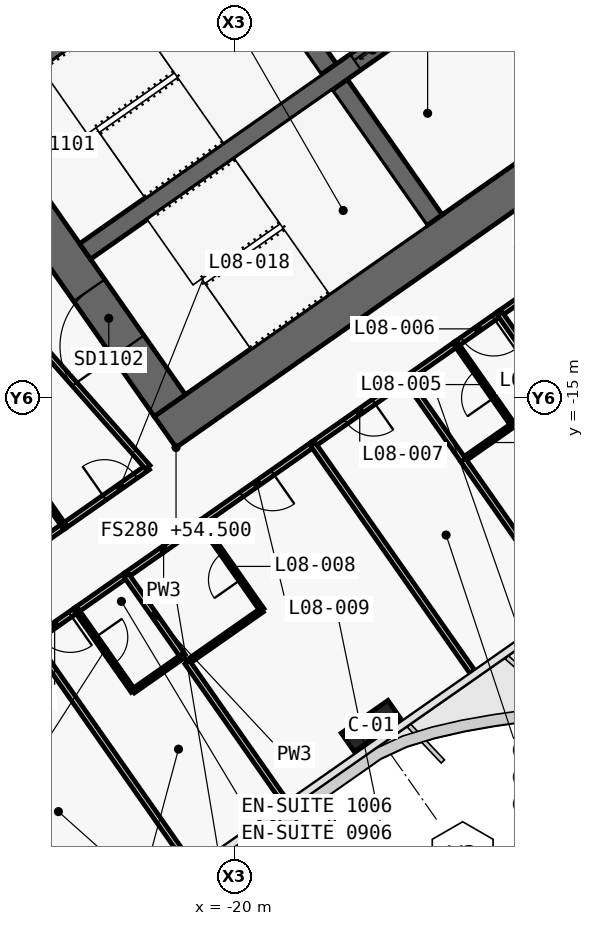
"""IFC4 building model, lengths in metres.
Left out: names, types, materials, properties, quantities, classifications, styles, units other than length and angle.
Written with IfcOpenShell. Run it as: python <this file> out.ifc"""

import sys

from ifc_helpers import new_model, si_unit, direction, frame, frame_2d, origin, origin_2d, place, context, subcontext, project, spatial, polyline, rectangle, outline, extrude, element, fill, save


model = new_model("IFC4")
c1 = context("Model", 3, precision=1e-05, world=origin(), true_north=direction((0.0, 1.0)))
c2 = subcontext(c1, "Body", "Model", "MODEL_VIEW")
j1 = project(units=[si_unit("LENGTHUNIT", "METRE"), si_unit("PLANEANGLEUNIT", "RADIAN")], contexts=[c1])
p1 = place(None, origin())
s1 = spatial("IfcSite", under=j1, at=p1, CompositionType="ELEMENT")
p2 = place(p1, origin())
s2 = spatial("IfcBuilding", under=s1, at=p2, CompositionType="ELEMENT")
p3 = place(p2, frame((0.0, 0.0, 54.5)))
s3 = spatial("IfcBuildingStorey", under=s2, at=p3, CompositionType="ELEMENT", Elevation=54.5)
p4 = place(p3, frame((0.037, 11.867, 0.0), z_axis=(0.0, 0.0, 1.0), x_axis=(-0.819155306259, -0.573571777746, 0.0)))
e1 = element("IfcWall", 1, at=p4, inside=s3, PredefinedType="SHEAR", context=c2, shape_type="SweptSolid", body=[
    extrude(outline(polyline([(33.837, 0.5), (0.7, 0.5), (0.0, -0.5), (33.837, -0.5), (33.837, 0.5)])), origin(), (0.0, 0.0, 1.0), 3.6),
])
p5 = place(p3, frame((0.037, -0.585, 0.0), z_axis=(0.0, 0.0, 1.0), x_axis=(-0.819157152511, -0.573569140985, 0.0)))
e2 = element("IfcWall", 2, at=p5, inside=s3, PredefinedType="SHEAR", context=c2, shape_type="SweptSolid", body=[
    extrude(outline(polyline([(26.695, 0.5), (0.7, 0.5), (0.0, -0.5), (26.695, -0.5), (26.695, 0.5)])), origin(), (0.0, 0.0, 1.0), 3.6),
])
p6 = place(p5, frame((2.995, 0.0, 0.0)))
e3 = element("IfcOpeningElement", 3, at=p6, cuts=e2, PredefinedType="OPENING", context=c2, shape_type="SweptSolid", body=[
    extrude(rectangle(XDim=2.4, YDim=2.1, at=frame_2d((1.2, 1.05))), frame((0.0, 0.51, 0.0), z_axis=(0.0, -1.0, 0.0), x_axis=(1.0, 0.0, 0.0)), (0.0, 0.0, 1.0), 1.02),
])
p7 = place(p5, frame((11.995, 0.0, 0.0)))
e4 = element("IfcOpeningElement", 4, at=p7, cuts=e2, PredefinedType="OPENING", context=c2, shape_type="SweptSolid", body=[
    extrude(rectangle(XDim=2.4, YDim=2.1, at=frame_2d((1.2, 1.05))), frame((0.0, 0.51, 0.0), z_axis=(0.0, -1.0, 0.0), x_axis=(1.0, 0.0, 0.0)), (0.0, 0.0, 1.0), 1.02),
])
p8 = place(p3, frame((-21.708, -15.2, 0.0), z_axis=(0.0, 0.0, 1.0), x_axis=(-0.573576324356, 0.819152122709, 0.0)))
e5 = element("IfcWall", 5, at=p8, inside=s3, PredefinedType="SHEAR", context=c2, shape_type="SweptSolid", body=[
    extrude(outline(polyline([(0.0, 0.5), (0.0, -0.5), (9.2, -0.5), (9.2, 0.5), (0.0, 0.5)])), origin(), (0.0, 0.0, 1.0), 3.6),
])
p9 = place(p8, frame((6.1, 0.0, 0.0)))
e6 = element("IfcOpeningElement", 6, at=p9, cuts=e5, PredefinedType="OPENING", context=c2, shape_type="SweptSolid", body=[
    extrude(rectangle(XDim=1.8, YDim=2.1, at=frame_2d((0.9, 1.05))), frame((0.0, 0.51, 0.0), z_axis=(0.0, -1.0, 0.0), x_axis=(1.0, 0.0, 0.0)), (0.0, 0.0, 1.0), 1.02),
])
p10 = place(p8, frame((1.9, 0.0, 0.0)))
e7 = element("IfcOpeningElement", 7, at=p10, cuts=e5, PredefinedType="OPENING", context=c2, shape_type="SweptSolid", body=[
    extrude(rectangle(XDim=1.8, YDim=2.1, at=frame_2d((0.9, 1.05))), frame((0.0, 0.51, 0.0), z_axis=(0.0, -1.0, 0.0), x_axis=(1.0, 0.0, 0.0)), (0.0, 0.0, 1.0), 1.02),
])
p11 = place(p3, frame((-14.745, -10.324, 0.0), z_axis=(0.0, 0.0, 1.0), x_axis=(-0.57356780395, 0.819158088694, 0.0)))
e8 = element("IfcWall", 8, at=p11, inside=s3, PredefinedType="SHEAR", context=c2, shape_type="SweptSolid", body=[
    extrude(outline(polyline([(4.35, 0.25), (0.0, 0.25), (0.0, -0.25), (4.35, -0.25), (4.35, 0.25)])), origin(), (0.0, 0.0, 1.0), 3.6),
])
p12 = place(p3, frame((-17.527, -6.352, 0.0), z_axis=(0.0, 0.0, 1.0), x_axis=(-0.573530143085, 0.819184457233, 0.0)))
e9 = element("IfcWall", 9, at=p12, inside=s3, PredefinedType="SHEAR", context=c2, shape_type="SweptSolid", body=[
    extrude(outline(polyline([(4.35, -0.25), (4.35, 0.25), (0.0, 0.25), (0.0, -0.25), (4.35, -0.25)])), origin(), (0.0, 0.0, 1.0), 3.6),
])
p13 = place(p3, frame((-2.638, 3.768, 0.0), z_axis=(0.0, 0.0, 1.0), x_axis=(-0.819148977158, -0.573580816643, 0.0)))
e10 = element("IfcWall", 10, at=p13, inside=s3, PredefinedType="SHEAR", context=c2, shape_type="SweptSolid", body=[
    extrude(outline(polyline([(26.0, 0.25), (0.0, 0.25), (0.0, -0.25), (26.0, -0.25), (26.0, 0.25)])), origin(), (0.0, 0.0, 1.0), 3.6),
])
p14 = place(p13, frame((1.169, 0.0, 0.0)))
e11 = element("IfcOpeningElement", 11, at=p14, cuts=e10, PredefinedType="OPENING", context=c2, shape_type="SweptSolid", body=[
    extrude(rectangle(XDim=1.1, YDim=2.1, at=frame_2d((0.55, 1.05))), frame((0.0, 0.26, 0.0), z_axis=(0.0, -1.0, 0.0), x_axis=(1.0, 0.0, 0.0)), (0.0, 0.0, 1.0), 0.52),
])
p15 = place(p13, frame((3.206, 0.0, 0.0)))
e12 = element("IfcOpeningElement", 12, at=p15, cuts=e10, PredefinedType="OPENING", context=c2, shape_type="SweptSolid", body=[
    extrude(rectangle(XDim=1.1, YDim=2.1, at=frame_2d((0.55, 1.05))), frame((0.0, 0.26, 0.0), z_axis=(0.0, -1.0, 0.0), x_axis=(1.0, 0.0, 0.0)), (0.0, 0.0, 1.0), 0.52),
])
p16 = place(p13, frame((5.244, 0.0, 0.0)))
e13 = element("IfcOpeningElement", 13, at=p16, cuts=e10, PredefinedType="OPENING", context=c2, shape_type="SweptSolid", body=[
    extrude(rectangle(XDim=1.1, YDim=2.1, at=frame_2d((0.55, 1.05))), frame((0.0, 0.26, 0.0), z_axis=(0.0, -1.0, 0.0), x_axis=(1.0, 0.0, 0.0)), (0.0, 0.0, 1.0), 0.52),
])
p17 = place(p13, frame((7.281, 0.0, 0.0)))
e14 = element("IfcOpeningElement", 14, at=p17, cuts=e10, PredefinedType="OPENING", context=c2, shape_type="SweptSolid", body=[
    extrude(rectangle(XDim=1.1, YDim=2.1, at=frame_2d((0.55, 1.05))), frame((0.0, 0.26, 0.0), z_axis=(0.0, -1.0, 0.0), x_axis=(1.0, 0.0, 0.0)), (0.0, 0.0, 1.0), 0.52),
])
p18 = place(p13, frame((9.688, 0.0, 0.0)))
e15 = element("IfcOpeningElement", 15, at=p18, cuts=e10, PredefinedType="OPENING", context=c2, shape_type="SweptSolid", body=[
    extrude(rectangle(XDim=1.1, YDim=2.1, at=frame_2d((0.55, 1.05))), frame((0.0, 0.26, 0.0), z_axis=(0.0, -1.0, 0.0), x_axis=(1.0, 0.0, 0.0)), (0.0, 0.0, 1.0), 0.52),
])
p19 = place(p13, frame((11.863, 0.0, 0.0)))
e16 = element("IfcOpeningElement", 16, at=p19, cuts=e10, PredefinedType="OPENING", context=c2, shape_type="SweptSolid", body=[
    extrude(rectangle(XDim=1.1, YDim=2.1, at=frame_2d((0.55, 1.05))), frame((0.0, 0.26, 0.0), z_axis=(0.0, -1.0, 0.0), x_axis=(1.0, 0.0, 0.0)), (0.0, 0.0, 1.0), 0.52),
])
p20 = place(p13, frame((14.038, 0.0, 0.0)))
e17 = element("IfcOpeningElement", 17, at=p20, cuts=e10, PredefinedType="OPENING", context=c2, shape_type="SweptSolid", body=[
    extrude(rectangle(XDim=1.1, YDim=2.1, at=frame_2d((0.55, 1.05))), frame((0.0, 0.26, 0.0), z_axis=(0.0, -1.0, 0.0), x_axis=(1.0, 0.0, 0.0)), (0.0, 0.0, 1.0), 0.52),
])
p21 = place(p13, frame((16.212, 0.0, 0.0)))
e18 = element("IfcOpeningElement", 18, at=p21, cuts=e10, PredefinedType="OPENING", context=c2, shape_type="SweptSolid", body=[
    extrude(rectangle(XDim=1.1, YDim=2.1, at=frame_2d((0.55, 1.05))), frame((0.0, 0.26, 0.0), z_axis=(0.0, -1.0, 0.0), x_axis=(1.0, 0.0, 0.0)), (0.0, 0.0, 1.0), 0.52),
])
p22 = place(p3, frame((-16.41, -23.637, 0.0), z_axis=(0.0, 0.0, 1.0), x_axis=(-0.819152044289, -0.573576436351, 0.0)))
e19 = element("IfcColumn", 19, at=p22, inside=s3, PredefinedType="COLUMN", context=c2, shape_type="SweptSolid", body=[
    extrude(rectangle(XDim=1.5, YDim=0.6, at=origin_2d()), origin(), (0.0, 0.0, 1.0), 3.6),
])
p23 = place(p3, frame((-24.493, -18.371, 0.0), z_axis=(0.0, 0.0, 1.0), x_axis=(0.819176640776, 0.573541307325, 0.0)))
e20 = element("IfcWall", 20, at=p23, inside=s3, PredefinedType="PARTITIONING", context=c2, shape_type="SweptSolid", body=[
    extrude(rectangle(XDim=2.698, YDim=0.15, at=frame_2d((1.349, 0.0))), origin(), (0.0, 0.0, 1.0), 3.32),
])
p24 = place(p23, frame((1.301, 0.0, 0.0)))
e21 = element("IfcOpeningElement", 21, at=p24, cuts=e20, PredefinedType="OPENING", context=c2, shape_type="SweptSolid", body=[
    extrude(rectangle(XDim=1.0, YDim=2.1, at=frame_2d((0.5, 1.05))), frame((0.0, 0.085, 0.0), z_axis=(0.0, -1.0, 0.0), x_axis=(1.0, 0.0, 0.0)), (0.0, 0.0, 1.0), 0.17),
])
p25 = place(p3, frame((-26.46, -19.748, 0.0), z_axis=(0.0, 0.0, 1.0), x_axis=(0.819179439794, 0.573537309527, 0.0)))
e22 = element("IfcWall", 22, at=p25, inside=s3, PredefinedType="PARTITIONING", context=c2, shape_type="SweptSolid", body=[
    extrude(rectangle(XDim=2.404, YDim=0.15, at=frame_2d((1.202, 0.0))), origin(), (0.0, 0.0, 1.0), 3.32),
])
p26 = place(p3, frame((-10.074, -10.716, 0.0), z_axis=(0.0, 0.0, 1.0), x_axis=(-0.819145961204, -0.573585123798, 0.0)))
e23 = element("IfcWall", 23, at=p26, inside=s3, PredefinedType="PARTITIONING", context=c2, shape_type="SweptSolid", body=[
    extrude(rectangle(XDim=3.603, YDim=0.15, at=frame_2d((1.802, 0.0))), origin(), (0.0, 0.0, 1.0), 2.6),
])
p27 = place(p26, frame((1.301, 0.0, 0.0)))
e24 = element("IfcOpeningElement", 24, at=p27, cuts=e23, PredefinedType="OPENING", context=c2, shape_type="SweptSolid", body=[
    extrude(rectangle(XDim=1.0, YDim=2.1, at=frame_2d((0.5, 1.05))), frame((0.0, 0.085, 0.0), z_axis=(0.0, -1.0, 0.0), x_axis=(1.0, 0.0, 0.0)), (0.0, 0.0, 1.0), 0.17),
])
p28 = place(p3, frame((-13.022, -12.781, 0.0), z_axis=(0.0, 0.0, 1.0), x_axis=(-0.81914197737, -0.573590813132, 0.0)))
e25 = element("IfcWall", 25, at=p28, inside=s3, PredefinedType="PARTITIONING", context=c2, shape_type="SweptSolid", body=[
    extrude(rectangle(XDim=1.403, YDim=0.15, at=frame_2d((0.701, 0.0))), origin(), (0.0, 0.0, 1.0), 2.6),
])
p29 = place(p28, frame((0.202, 0.0, 0.0)))
e26 = element("IfcOpeningElement", 26, at=p29, cuts=e25, PredefinedType="OPENING", context=c2, shape_type="SweptSolid", body=[
    extrude(rectangle(XDim=1.0, YDim=2.1, at=frame_2d((0.5, 1.05))), frame((0.0, 0.085, 0.0), z_axis=(0.0, -1.0, 0.0), x_axis=(1.0, 0.0, 0.0)), (0.0, 0.0, 1.0), 0.17),
])
p30 = place(p3, frame((-14.169, -13.584, 0.0), z_axis=(0.0, 0.0, 1.0), x_axis=(-0.819189013667, -0.573523634986, 0.0)))
e27 = element("IfcWall", 27, at=p30, inside=s3, PredefinedType="PARTITIONING", context=c2, shape_type="SweptSolid", body=[
    extrude(rectangle(XDim=1.604, YDim=0.15, at=frame_2d((0.802, 0.0))), origin(), (0.0, 0.0, 1.0), 3.32),
])
p31 = place(p3, frame((-15.48, -14.501, 0.0), z_axis=(0.0, 0.0, 1.0), x_axis=(-0.819193738533, -0.573516886193, 0.0)))
e28 = element("IfcWall", 28, at=p31, inside=s3, PredefinedType="PARTITIONING", context=c2, shape_type="SweptSolid", body=[
    extrude(rectangle(XDim=3.004, YDim=0.15, at=frame_2d((1.502, 0.0))), origin(), (0.0, 0.0, 1.0), 3.32),
])
p32 = place(p31, frame((1.052, 0.0, 0.0)))
e29 = element("IfcOpeningElement", 29, at=p32, cuts=e28, PredefinedType="OPENING", context=c2, shape_type="SweptSolid", body=[
    extrude(rectangle(XDim=0.9, YDim=2.1, at=frame_2d((0.45, 1.05))), frame((0.0, 0.085, 0.0), z_axis=(0.0, -1.0, 0.0), x_axis=(1.0, 0.0, 0.0)), (0.0, 0.0, 1.0), 0.17),
])
p33 = place(p3, frame((-17.937, -16.222, 0.0), z_axis=(0.0, 0.0, 1.0), x_axis=(-0.819145961204, -0.573585123798, 0.0)))
e30 = element("IfcWall", 30, at=p33, inside=s3, PredefinedType="PARTITIONING", context=c2, shape_type="SweptSolid", body=[
    extrude(rectangle(XDim=3.603, YDim=0.15, at=frame_2d((1.802, 0.0))), origin(), (0.0, 0.0, 1.0), 2.6),
])
p34 = place(p33, frame((1.302, 0.0, 0.0)))
e31 = element("IfcOpeningElement", 31, at=p34, cuts=e30, PredefinedType="OPENING", context=c2, shape_type="SweptSolid", body=[
    extrude(rectangle(XDim=1.0, YDim=2.1, at=frame_2d((0.5, 1.05))), frame((0.0, 0.085, 0.0), z_axis=(0.0, -1.0, 0.0), x_axis=(1.0, 0.0, 0.0)), (0.0, 0.0, 1.0), 0.17),
])
p35 = place(p3, frame((-20.886, -18.287, 0.0), z_axis=(0.0, 0.0, 1.0), x_axis=(-0.819146032251, -0.573585022335, 0.0)))
e32 = element("IfcWall", 32, at=p35, inside=s3, PredefinedType="PARTITIONING", context=c2, shape_type="SweptSolid", body=[
    extrude(rectangle(XDim=2.404, YDim=0.15, at=frame_2d((1.202, 0.0))), origin(), (0.0, 0.0, 1.0), 3.32),
])
p36 = place(p3, frame((-24.164, -20.582, 0.0), z_axis=(0.0, 0.0, 1.0), x_axis=(-0.819060210533, -0.573707566205, 0.0)))
e33 = element("IfcWall", 33, at=p36, inside=s3, PredefinedType="PARTITIONING", context=c2, shape_type="SweptSolid", body=[
    extrude(rectangle(XDim=1.403, YDim=0.15, at=frame_2d((0.702, 0.0))), origin(), (0.0, 0.0, 1.0), 3.32),
])
p37 = place(p36, frame((0.201, 0.0, 0.0)))
e34 = element("IfcOpeningElement", 34, at=p37, cuts=e33, PredefinedType="OPENING", context=c2, shape_type="SweptSolid", body=[
    extrude(rectangle(XDim=1.0, YDim=2.1, at=frame_2d((0.5, 1.05))), frame((0.0, 0.085, 0.0), z_axis=(0.0, -1.0, 0.0), x_axis=(1.0, 0.0, 0.0)), (0.0, 0.0, 1.0), 0.17),
])
p38 = place(p3, frame((-22.852, -19.664, 0.0), z_axis=(0.0, 0.0, 1.0), x_axis=(-0.819138938282, -0.573595153214, 0.0)))
e35 = element("IfcWall", 35, at=p38, inside=s3, PredefinedType="PARTITIONING", context=c2, shape_type="SweptSolid", body=[
    extrude(rectangle(XDim=1.604, YDim=0.15, at=frame_2d((0.802, 0.0))), origin(), (0.0, 0.0, 1.0), 3.32),
])
p39 = place(p3, frame((-22.284, -16.827, 0.0), z_axis=(0.0, 0.0, 1.0), x_axis=(-0.661545117561, 0.749905365651, 0.0)))
e36 = element("IfcWall", 36, at=p39, inside=s3, PredefinedType="PARTITIONING", context=c2, shape_type="SweptSolid", body=[
    extrude(rectangle(XDim=6.543, YDim=0.15, at=frame_2d((3.271, 0.0))), origin(), (0.0, 0.0, 1.0), 2.6),
])
p40 = place(p3, frame((-24.492, -18.37, 0.0), z_axis=(0.0, 0.0, 1.0), x_axis=(-0.573550118428, 0.819170471667, 0.0)))
e37 = element("IfcWall", 37, at=p40, inside=s3, PredefinedType="PARTITIONING", context=c2, shape_type="SweptSolid", body=[
    extrude(rectangle(XDim=2.8, YDim=0.12, at=frame_2d((1.4, 0.0))), origin(), (0.0, 0.0, 1.0), 2.6),
])
p41 = place(p40, frame((0.975, 0.0, 0.0)))
e38 = element("IfcOpeningElement", 38, at=p41, cuts=e37, PredefinedType="OPENING", context=c2, shape_type="SweptSolid", body=[
    extrude(rectangle(XDim=0.85, YDim=2.05, at=frame_2d((0.425, 1.025))), frame((0.0, 0.07, 0.0), z_axis=(0.0, -1.0, 0.0), x_axis=(1.0, 0.0, 0.0)), (0.0, 0.0, 1.0), 0.14),
])
p42 = place(p3, frame((-9.221, -18.213, 0.0), z_axis=(0.0, 0.0, 1.0), x_axis=(-0.573556251799, 0.819166177294, 0.0)))
e39 = element("IfcWall", 39, at=p42, inside=s3, PredefinedType="PARTITIONING", context=c2, shape_type="SweptSolid", body=[
    extrude(rectangle(XDim=6.63, YDim=0.15, at=frame_2d((3.315, 0.0))), origin(), (0.0, 0.0, 1.0), 2.6),
])
p43 = place(p3, frame((-13.99, -16.633, 0.0), z_axis=(0.0, 0.0, 1.0), x_axis=(0.819131543282, 0.57360571371, 0.0)))
e40 = element("IfcWall", 40, at=p43, inside=s3, PredefinedType="PARTITIONING", context=c2, shape_type="SweptSolid", body=[
    extrude(rectangle(XDim=1.6, YDim=0.12, at=frame_2d((0.8, 0.0))), origin(), (0.0, 0.0, 1.0), 3.32),
])
p44 = place(p3, frame((-12.679, -15.714, 0.0), z_axis=(0.0, 0.0, 1.0), x_axis=(-0.573537965655, 0.819178980414, 0.0)))
e41 = element("IfcWall", 41, at=p44, inside=s3, PredefinedType="PARTITIONING", context=c2, shape_type="SweptSolid", body=[
    extrude(rectangle(XDim=2.6, YDim=0.12, at=frame_2d((1.3, 0.0))), origin(), (0.0, 0.0, 1.0), 3.32),
])
p45 = place(p44, frame((0.875, 0.0, 0.0)))
e42 = element("IfcOpeningElement", 42, at=p45, cuts=e41, PredefinedType="OPENING", context=c2, shape_type="SweptSolid", body=[
    extrude(rectangle(XDim=0.85, YDim=2.05, at=frame_2d((0.425, 1.025))), frame((0.0, 0.07, 0.0), z_axis=(0.0, -1.0, 0.0), x_axis=(1.0, 0.0, 0.0)), (0.0, 0.0, 1.0), 0.14),
])
p46 = place(p3, frame((-11.294, -20.482, 0.0), z_axis=(0.0, 0.0, 1.0), x_axis=(-0.573559978739, 0.819163567787, 0.0)))
e43 = element("IfcWall", 43, at=p46, inside=s3, PredefinedType="PARTITIONING", context=c2, shape_type="SweptSolid", body=[
    extrude(rectangle(XDim=4.699, YDim=0.15, at=frame_2d((2.349, 0.0))), origin(), (0.0, 0.0, 1.0), 2.5),
])
p47 = place(p3, frame((-13.99, -16.632, 0.0), z_axis=(0.0, 0.0, 1.0), x_axis=(-0.573582085028, 0.819148089014, 0.0)))
e44 = element("IfcWall", 44, at=p47, inside=s3, PredefinedType="PARTITIONING", context=c2, shape_type="SweptSolid", body=[
    extrude(rectangle(XDim=2.6, YDim=0.15, at=frame_2d((1.3, 0.0))), origin(), (0.0, 0.0, 1.0), 3.32),
])
p48 = place(p3, frame((-13.752, -22.203, 0.0), z_axis=(0.0, 0.0, 1.0), x_axis=(-0.573594765376, 0.819139209862, 0.0)))
e45 = element("IfcWall", 45, at=p48, inside=s3, PredefinedType="PARTITIONING", context=c2, shape_type="SweptSolid", body=[
    extrude(rectangle(XDim=7.3, YDim=0.15, at=frame_2d((3.65, 0.0))), origin(), (0.0, 0.0, 1.0), 2.5),
])
p49 = place(p3, frame((-21.247, -21.959, 0.0), z_axis=(0.0, 0.0, 1.0), x_axis=(0.819141114317, 0.573592045652, 0.0)))
e46 = element("IfcWall", 46, at=p49, inside=s3, PredefinedType="PARTITIONING", context=c2, shape_type="SweptSolid", body=[
    extrude(rectangle(XDim=2.4, YDim=0.12, at=frame_2d((1.2, 0.0))), origin(), (0.0, 0.0, 1.0), 3.32),
])
p50 = place(p3, frame((-19.281, -20.581, 0.0), z_axis=(0.0, 0.0, 1.0), x_axis=(-0.573550118428, 0.819170471667, 0.0)))
e47 = element("IfcWall", 47, at=p50, inside=s3, PredefinedType="PARTITIONING", context=c2, shape_type="SweptSolid", body=[
    extrude(rectangle(XDim=2.8, YDim=0.12, at=frame_2d((1.4, 0.0))), origin(), (0.0, 0.0, 1.0), 3.32),
])
p51 = place(p50, frame((0.975, 0.0, 0.0)))
e48 = element("IfcOpeningElement", 48, at=p51, cuts=e47, PredefinedType="OPENING", context=c2, shape_type="SweptSolid", body=[
    extrude(rectangle(XDim=0.85, YDim=2.05, at=frame_2d((0.425, 1.025))), frame((0.0, 0.07, 0.0), z_axis=(0.0, -1.0, 0.0), x_axis=(1.0, 0.0, 0.0)), (0.0, 0.0, 1.0), 0.14),
])
p52 = place(p3, frame((-18.667, -25.645, 0.0), z_axis=(0.0, 0.0, 1.0), x_axis=(-0.573589807488, 0.819142681555, 0.0)))
e49 = element("IfcWall", 49, at=p52, inside=s3, PredefinedType="PARTITIONING", context=c2, shape_type="SweptSolid", body=[
    extrude(rectangle(XDim=4.499, YDim=0.15, at=frame_2d((2.25, 0.0))), origin(), (0.0, 0.0, 1.0), 2.5),
])
p53 = place(p3, frame((-21.361, -21.796, 0.0), z_axis=(0.0, 0.0, 1.0), x_axis=(-0.573588285102, 0.819143747577, 0.0)))
e50 = element("IfcWall", 50, at=p53, inside=s3, PredefinedType="PARTITIONING", context=c2, shape_type="SweptSolid", body=[
    extrude(rectangle(XDim=2.602, YDim=0.15, at=frame_2d((1.301, 0.0))), origin(), (0.0, 0.0, 1.0), 3.32),
])
p54 = place(p3, frame((-24.165, -20.583, 0.0), z_axis=(0.0, 0.0, 1.0), x_axis=(0.573537965655, -0.819178980414, 0.0)))
e51 = element("IfcWall", 51, at=p54, inside=s3, PredefinedType="PARTITIONING", context=c2, shape_type="SweptSolid", body=[
    extrude(rectangle(XDim=2.6, YDim=0.12, at=frame_2d((1.3, 0.0))), origin(), (0.0, 0.0, 1.0), 3.32),
])
p55 = place(p54, frame((0.875, 0.0, 0.0)))
e52 = element("IfcOpeningElement", 52, at=p55, cuts=e51, PredefinedType="OPENING", context=c2, shape_type="SweptSolid", body=[
    extrude(rectangle(XDim=0.85, YDim=2.05, at=frame_2d((0.425, 1.025))), frame((0.0, 0.07, 0.0), z_axis=(0.0, -1.0, 0.0), x_axis=(1.0, 0.0, 0.0)), (0.0, 0.0, 1.0), 0.14),
])
p56 = place(p3, frame((-22.673, -22.713, 0.0), z_axis=(0.0, 0.0, 1.0), x_axis=(0.819131543282, 0.57360571371, 0.0)))
e53 = element("IfcWall", 53, at=p56, inside=s3, PredefinedType="PARTITIONING", context=c2, shape_type="SweptSolid", body=[
    extrude(rectangle(XDim=1.6, YDim=0.12, at=frame_2d((0.8, 0.0))), origin(), (0.0, 0.0, 1.0), 3.32),
])
p57 = place(p3, frame((-21.124, -27.365, 0.0), z_axis=(0.0, 0.0, 1.0), x_axis=(-0.573572324301, 0.819154923562, 0.0)))
e54 = element("IfcWall", 54, at=p57, inside=s3, PredefinedType="PARTITIONING", context=c2, shape_type="SweptSolid", body=[
    extrude(rectangle(XDim=7.3, YDim=0.15, at=frame_2d((3.65, 0.0))), origin(), (0.0, 0.0, 1.0), 2.5),
])
p58 = place(p21, origin())
e55 = element("IfcDoor", 55, at=p58, inside=s3, OperationType="SLIDING_TO_RIGHT", PredefinedType="DOOR", context=c2, shape_type="SweptSolid", body=[
    extrude(rectangle(XDim=1.1, YDim=2.1, at=frame_2d((0.55, 1.05))), frame((0.0, 0.025, 0.0), z_axis=(0.0, -1.0, 0.0), x_axis=(1.0, 0.0, 0.0)), (0.0, 0.0, 1.0), 0.05),
])
fill(e18, e55)
p59 = place(p10, origin())
e56 = element("IfcDoor", 56, at=p59, inside=s3, OperationType="DOUBLE_DOOR_SINGLE_SWING", PredefinedType="DOOR", context=c2, shape_type="SweptSolid", body=[
    extrude(rectangle(XDim=1.8, YDim=2.1, at=frame_2d((0.9, 1.05))), frame((0.0, 0.025, 0.0), z_axis=(0.0, -1.0, 0.0), x_axis=(1.0, 0.0, 0.0)), (0.0, 0.0, 1.0), 0.05),
])
fill(e7, e56)
p60 = place(p45, origin())
e57 = element("IfcDoor", 57, at=p60, inside=s3, OperationType="SINGLE_SWING_RIGHT", PredefinedType="DOOR", context=c2, shape_type="SweptSolid", body=[
    extrude(rectangle(XDim=0.85, YDim=2.05, at=frame_2d((0.425, 1.025))), frame((0.0, 0.025, 0.0), z_axis=(0.0, -1.0, 0.0), x_axis=(1.0, 0.0, 0.0)), (0.0, 0.0, 1.0), 0.05),
])
fill(e42, e57)
p61 = place(p29, origin())
e58 = element("IfcDoor", 58, at=p61, inside=s3, OperationType="SINGLE_SWING_LEFT", PredefinedType="DOOR", context=c2, shape_type="SweptSolid", body=[
    extrude(rectangle(XDim=1.0, YDim=2.1, at=frame_2d((0.5, 1.05))), frame((0.0, 0.025, 0.0), z_axis=(0.0, -1.0, 0.0), x_axis=(1.0, 0.0, 0.0)), (0.0, 0.0, 1.0), 0.05),
])
fill(e26, e58)
p62 = place(p32, origin())
e59 = element("IfcDoor", 59, at=p62, inside=s3, OperationType="SINGLE_SWING_RIGHT", PredefinedType="DOOR", context=c2, shape_type="SweptSolid", body=[
    extrude(rectangle(XDim=0.9, YDim=2.1, at=frame_2d((0.45, 1.05))), frame((0.0, 0.025, 0.0), z_axis=(0.0, -1.0, 0.0), x_axis=(1.0, 0.0, 0.0)), (0.0, 0.0, 1.0), 0.05),
])
fill(e29, e59)
p63 = place(p51, origin())
e60 = element("IfcDoor", 60, at=p63, inside=s3, OperationType="SINGLE_SWING_RIGHT", PredefinedType="DOOR", context=c2, shape_type="SweptSolid", body=[
    extrude(rectangle(XDim=0.85, YDim=2.05, at=frame_2d((0.425, 1.025))), frame((0.0, 0.025, 0.0), z_axis=(0.0, -1.0, 0.0), x_axis=(1.0, 0.0, 0.0)), (0.0, 0.0, 1.0), 0.05),
])
fill(e48, e60)
p64 = place(p34, origin())
e61 = element("IfcDoor", 61, at=p64, inside=s3, OperationType="SINGLE_SWING_LEFT", PredefinedType="DOOR", context=c2, shape_type="SweptSolid", body=[
    extrude(rectangle(XDim=1.0, YDim=2.1, at=frame_2d((0.5, 1.05))), frame((0.0, 0.025, 0.0), z_axis=(0.0, -1.0, 0.0), x_axis=(1.0, 0.0, 0.0)), (0.0, 0.0, 1.0), 0.05),
])
fill(e31, e61)
p65 = place(p55, origin())
e62 = element("IfcDoor", 62, at=p65, inside=s3, OperationType="SINGLE_SWING_LEFT", PredefinedType="DOOR", context=c2, shape_type="SweptSolid", body=[
    extrude(rectangle(XDim=0.85, YDim=2.05, at=frame_2d((0.425, 1.025))), frame((0.0, 0.025, 0.0), z_axis=(0.0, -1.0, 0.0), x_axis=(1.0, 0.0, 0.0)), (0.0, 0.0, 1.0), 0.05),
])
fill(e52, e62)
p66 = place(p37, origin())
e63 = element("IfcDoor", 63, at=p66, inside=s3, OperationType="SINGLE_SWING_RIGHT", PredefinedType="DOOR", context=c2, shape_type="SweptSolid", body=[
    extrude(rectangle(XDim=1.0, YDim=2.1, at=frame_2d((0.5, 1.05))), frame((0.0, 0.025, 0.0), z_axis=(0.0, -1.0, 0.0), x_axis=(1.0, 0.0, 0.0)), (0.0, 0.0, 1.0), 0.05),
])
fill(e34, e63)
p67 = place(p24, origin())
e64 = element("IfcDoor", 64, at=p67, inside=s3, OperationType="SINGLE_SWING_RIGHT", PredefinedType="DOOR", context=c2, shape_type="SweptSolid", body=[
    extrude(rectangle(XDim=1.0, YDim=2.1, at=frame_2d((0.5, 1.05))), frame((0.0, 0.025, 0.0), z_axis=(0.0, -1.0, 0.0), x_axis=(1.0, 0.0, 0.0)), (0.0, 0.0, 1.0), 0.05),
])
fill(e21, e64)
save(model, sys.argv[1])
